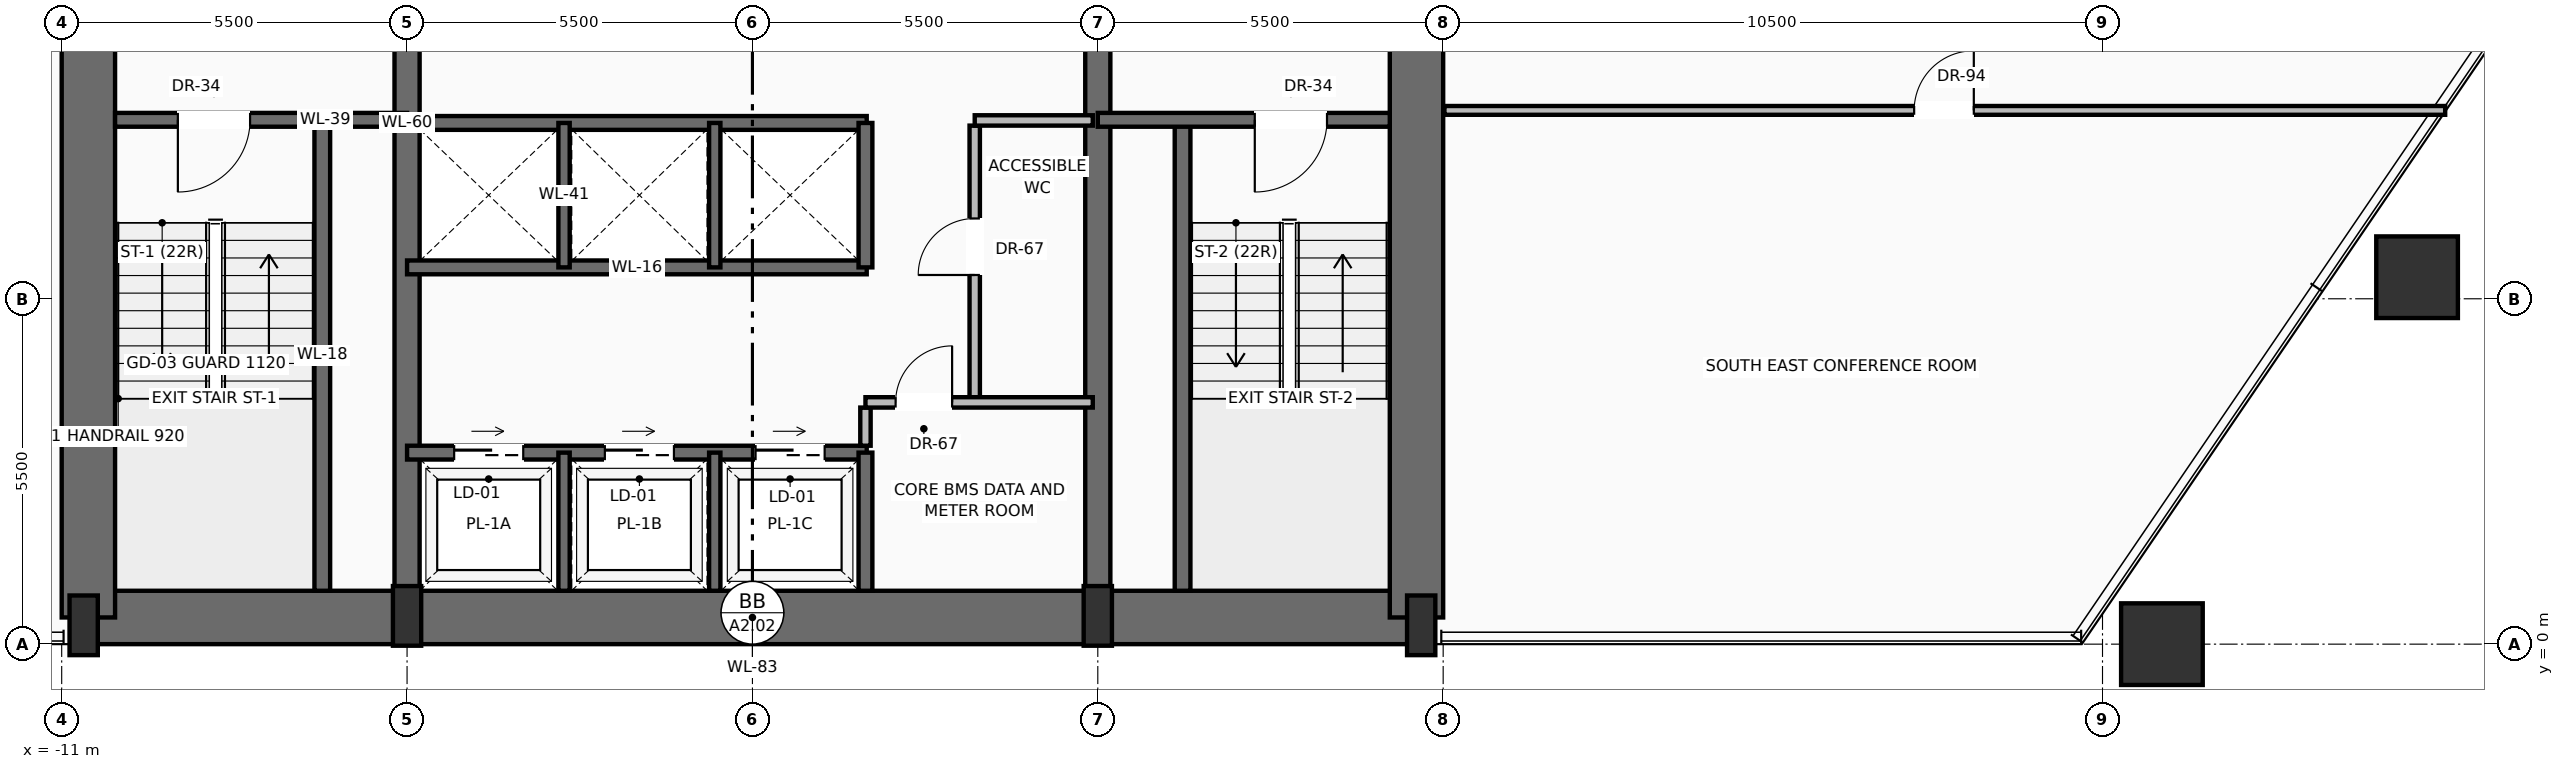
"""IFC4 building model, lengths in metres.
Left out: names, types, materials, properties, quantities, classifications, styles, units other than length and angle.
Written with IfcOpenShell. Run it as: python <this file> out.ifc"""

import sys

from ifc_helpers import new_model, si_unit, direction, frame, frame_2d, origin, origin_2d, place, context, subcontext, project, spatial, rectangle, hollow_rectangle, extrude, source, transform, mapped, element, fill, save


model = new_model("IFC4")
c1 = context("Model", 3, precision=1e-05, world=origin(), true_north=direction((0.0, 1.0)))
c2 = subcontext(c1, "Body", "Model", "MODEL_VIEW")
j1 = project(units=[si_unit("LENGTHUNIT", "METRE"), si_unit("PLANEANGLEUNIT", "RADIAN")], contexts=[c1])
p1 = place(None, origin())
s1 = spatial("IfcSite", under=j1, at=p1, CompositionType="ELEMENT")
p2 = place(p1, origin())
s2 = spatial("IfcBuilding", under=s1, at=p2, CompositionType="ELEMENT")
p3 = place(p2, frame((0.0, 0.0, 27.5)))
s3 = spatial("IfcBuildingStorey", under=s2, at=p3, CompositionType="ELEMENT", Elevation=27.5)
p4 = place(p3, frame((-10.65, 0.425, 0.0), z_axis=(0.0, 0.0, 1.0), x_axis=(1.0, 0.0, 0.0)))
e1 = element("IfcWall", 1, at=p4, inside=s3, PredefinedType="SHEAR", context=c2, shape_type="SweptSolid", body=[
    extrude(rectangle(XDim=21.3, YDim=0.85, at=frame_2d((10.65, 0.0))), origin(), (0.0, 0.0, 1.0), 3.45),
])
for number, where, z_axis, x_axis in (
    (2, (-10.575, 0.425, 0.0), (0.0, 0.0, 1.0), (0.0, 1.0, 0.0)),
    (3, (10.575, 0.425, 0.0), (0.0, 0.0, 1.0), (0.0, 1.0, 0.0)),
):
    element("IfcWall", number, at=place(p3, frame(where, z_axis=z_axis, x_axis=x_axis)), inside=s3, PredefinedType="SHEAR", context=c2, shape_type="SweptSolid", body=[
        extrude(rectangle(XDim=15.75, YDim=0.85, at=frame_2d((7.875, 0.0))), origin(), (0.0, 0.0, 1.0), 3.45),
    ])
p5 = place(p3, frame((-5.5, 0.425, 0.0), z_axis=(0.0, 0.0, 1.0), x_axis=(0.0, 1.0, 0.0)))
e4 = element("IfcWall", 4, at=p5, inside=s3, PredefinedType="SHEAR", context=c2, shape_type="SweptSolid", body=[
    extrude(rectangle(XDim=15.75, YDim=0.4, at=frame_2d((7.875, 0.0))), origin(), (0.0, 0.0, 1.0), 3.45),
])
p6 = place(p5, frame((9.075, 0.0, 0.0)))
e5 = element("IfcOpeningElement", 5, at=p6, cuts=e4, PredefinedType="OPENING", context=c2, shape_type="SweptSolid", body=[
    extrude(rectangle(XDim=1.1, YDim=2.2, at=frame_2d((0.55, 1.1))), frame((0.0, 0.21, 0.0), z_axis=(0.0, -1.0, 0.0), x_axis=(1.0, 0.0, 0.0)), (0.0, 0.0, 1.0), 0.42),
])
p7 = place(p3, frame((5.5, 0.425, 0.0), z_axis=(0.0, 0.0, 1.0), x_axis=(0.0, 1.0, 0.0)))
e6 = element("IfcWall", 6, at=p7, inside=s3, PredefinedType="SHEAR", context=c2, shape_type="SweptSolid", body=[
    extrude(rectangle(XDim=15.75, YDim=0.4, at=frame_2d((7.875, 0.0))), origin(), (0.0, 0.0, 1.0), 3.45),
])
p8 = place(p7, frame((9.075, 0.0, 0.0)))
e7 = element("IfcOpeningElement", 7, at=p8, cuts=e6, PredefinedType="OPENING", context=c2, shape_type="SweptSolid", body=[
    extrude(rectangle(XDim=1.1, YDim=2.2, at=frame_2d((0.55, 1.1))), frame((0.0, 0.21, 0.0), z_axis=(0.0, -1.0, 0.0), x_axis=(1.0, 0.0, 0.0)), (0.0, 0.0, 1.0), 0.42),
])
m1 = source(origin(), c2, "Body", "SweptSolid", [
    extrude(rectangle(XDim=0.45, YDim=0.95, at=origin_2d()), origin(), (0.0, 0.0, 1.0), 3.7),
])
for number, where, z_axis, x_axis in (
    (8, (-10.65, 0.3, 0.0), (0.0, 0.0, 1.0), (1.0, 0.0, 0.0)),
    (9, (-5.5, 0.45, 0.0), (0.0, 0.0, 1.0), (1.0, 0.0, 0.0)),
    (10, (5.5, 0.45, 0.0), (0.0, 0.0, 1.0), (1.0, 0.0, 0.0)),
    (11, (10.65, 0.3, 0.0), (0.0, 0.0, 1.0), (1.0, 0.0, 0.0)),
):
    element("IfcColumn", number, at=place(p3, frame(where, z_axis=z_axis, x_axis=x_axis)), inside=s3, PredefinedType="PILASTER", context=c2, shape_type="MappedRepresentation", body=[
        mapped(m1, transform((0.0, 0.0, 0.0), scale=1.0)),
    ])
m2 = source(origin(), c2, "Body", "SweptSolid", [
    extrude(hollow_rectangle(XDim=1.3, YDim=1.3, WallThickness=0.065, at=origin_2d()), origin(), (0.0, 0.0, 1.0), 3.692),
])
for number, where, z_axis, x_axis in (
    (12, (22.446, 0.0, 0.004), (0.017, 0.0, 1.0), (0.0, 1.0, 0.0)),
    (13, (26.51, 5.843, 0.004), (0.005, -0.017, 1.0), (0.958, 0.287, 0.0)),
):
    element("IfcColumn", number, at=place(p3, frame(where, z_axis=z_axis, x_axis=x_axis)), inside=s3, PredefinedType="COLUMN", context=c2, shape_type="MappedRepresentation", body=[
        mapped(m2, transform((0.0, 0.0, 0.0), scale=1.0)),
    ])
p9 = place(p3, frame((-6.85, 0.85, 0.0), z_axis=(0.0, 0.0, 1.0), x_axis=(0.0, 1.0, 0.0)))
e14 = element("IfcWall", 14, at=p9, inside=s3, PredefinedType="SOLIDWALL", context=c2, shape_type="SweptSolid", body=[
    extrude(rectangle(XDim=7.5, YDim=0.25, at=frame_2d((3.75, 0.0))), origin(), (0.0, 0.0, 1.0), 3.45),
])
p10 = place(p3, frame((-5.5, 8.35, 0.0), z_axis=(0.0, 0.0, 1.0), x_axis=(-1.0, 0.0, 0.0)))
e15 = element("IfcWall", 15, at=p10, inside=s3, PredefinedType="SOLIDWALL", context=c2, shape_type="SweptSolid", body=[
    extrude(rectangle(XDim=4.65, YDim=0.22, at=frame_2d((2.325, 0.0))), origin(), (0.0, 0.0, 1.0), 3.45),
])
p11 = place(p10, frame((2.5, 0.0, 0.0)))
e16 = element("IfcOpeningElement", 16, at=p11, cuts=e15, PredefinedType="OPENING", context=c2, shape_type="SweptSolid", body=[
    extrude(rectangle(XDim=1.15, YDim=2.2, at=frame_2d((0.575, 1.1))), frame((0.0, 0.12, 0.0), z_axis=(0.0, -1.0, 0.0), x_axis=(1.0, 0.0, 0.0)), (0.0, 0.0, 1.0), 0.24),
])
p12 = place(p3, frame((6.85, 0.85, 0.0), z_axis=(0.0, 0.0, 1.0), x_axis=(0.0, 1.0, 0.0)))
e17 = element("IfcWall", 17, at=p12, inside=s3, PredefinedType="SOLIDWALL", context=c2, shape_type="SweptSolid", body=[
    extrude(rectangle(XDim=7.5, YDim=0.25, at=frame_2d((3.75, 0.0))), origin(), (0.0, 0.0, 1.0), 3.45),
])
p13 = place(p3, frame((10.15, 8.35, 0.0), z_axis=(0.0, 0.0, 1.0), x_axis=(-1.0, 0.0, 0.0)))
e18 = element("IfcWall", 18, at=p13, inside=s3, PredefinedType="SOLIDWALL", context=c2, shape_type="SweptSolid", body=[
    extrude(rectangle(XDim=4.65, YDim=0.22, at=frame_2d((2.325, 0.0))), origin(), (0.0, 0.0, 1.0), 3.45),
])
p14 = place(p13, frame((1.0, 0.0, 0.0)))
e19 = element("IfcOpeningElement", 19, at=p14, cuts=e18, PredefinedType="OPENING", context=c2, shape_type="SweptSolid", body=[
    extrude(rectangle(XDim=1.15, YDim=2.2, at=frame_2d((0.575, 1.1))), frame((0.0, 0.12, 0.0), z_axis=(0.0, -1.0, 0.0), x_axis=(1.0, 0.0, 0.0)), (0.0, 0.0, 1.0), 0.24),
])
p15 = place(p3, frame((-5.5, 3.05, 0.0), z_axis=(0.0, 0.0, 1.0), x_axis=(1.0, 0.0, 0.0)))
e20 = element("IfcWall", 20, at=p15, inside=s3, PredefinedType="SOLIDWALL", context=c2, shape_type="SweptSolid", body=[
    extrude(rectangle(XDim=7.32, YDim=0.22, at=frame_2d((3.66, 0.0))), origin(), (0.0, 0.0, 1.0), 3.45),
])
p16 = place(p15, frame((0.75, 0.0, 0.0)))
e21 = element("IfcOpeningElement", 21, at=p16, cuts=e20, PredefinedType="OPENING", context=c2, shape_type="SweptSolid", body=[
    extrude(rectangle(XDim=1.1, YDim=2.2, at=frame_2d((0.55, 1.1))), frame((0.0, 0.12, 0.0), z_axis=(0.0, -1.0, 0.0), x_axis=(1.0, 0.0, 0.0)), (0.0, 0.0, 1.0), 0.24),
])
p17 = place(p15, frame((3.15, 0.0, 0.0)))
e22 = element("IfcOpeningElement", 22, at=p17, cuts=e20, PredefinedType="OPENING", context=c2, shape_type="SweptSolid", body=[
    extrude(rectangle(XDim=1.1, YDim=2.2, at=frame_2d((0.55, 1.1))), frame((0.0, 0.12, 0.0), z_axis=(0.0, -1.0, 0.0), x_axis=(1.0, 0.0, 0.0)), (0.0, 0.0, 1.0), 0.24),
])
p18 = place(p15, frame((5.55, 0.0, 0.0)))
e23 = element("IfcOpeningElement", 23, at=p18, cuts=e20, PredefinedType="OPENING", context=c2, shape_type="SweptSolid", body=[
    extrude(rectangle(XDim=1.1, YDim=2.2, at=frame_2d((0.55, 1.1))), frame((0.0, 0.12, 0.0), z_axis=(0.0, -1.0, 0.0), x_axis=(1.0, 0.0, 0.0)), (0.0, 0.0, 1.0), 0.24),
])
p19 = place(p3, frame((1.8, 0.85, 0.0), z_axis=(0.0, 0.0, 1.0), x_axis=(0.0, 1.0, 0.0)))
e24 = element("IfcWall", 24, at=p19, inside=s3, PredefinedType="SOLIDWALL", context=c2, shape_type="SweptSolid", body=[
    extrude(rectangle(XDim=2.2, YDim=0.22, at=frame_2d((1.1, 0.0))), origin(), (0.0, 0.0, 1.0), 3.45),
])
for number, where, z_axis, x_axis in (
    (25, (-3.0, 0.85, 0.0), (0.0, 0.0, 1.0), (0.0, 1.0, 0.0)),
    (26, (-0.6, 0.85, 0.0), (0.0, 0.0, 1.0), (0.0, 1.0, 0.0)),
):
    element("IfcWall", number, at=place(p3, frame(where, z_axis=z_axis, x_axis=x_axis)), inside=s3, PredefinedType="SOLIDWALL", context=c2, shape_type="SweptSolid", body=[
        extrude(rectangle(XDim=2.2, YDim=0.18, at=frame_2d((1.1, 0.0))), origin(), (0.0, 0.0, 1.0), 3.45),
    ])
p20 = place(p3, frame((1.8, 3.16, 0.0), z_axis=(0.0, 0.0, 1.0), x_axis=(0.0, 1.0, 0.0)))
e27 = element("IfcWall", 27, at=p20, inside=s3, PredefinedType="PARTITIONING", context=c2, shape_type="SweptSolid", body=[
    extrude(rectangle(XDim=0.608, YDim=0.165, at=frame_2d((0.304, 0.0))), origin(), (0.0, 0.0, 1.0), 3.442),
])
p21 = place(p3, frame((3.54, 3.933, 0.0), z_axis=(0.0, 0.0, 1.0), x_axis=(0.0, 1.0, 0.0)))
e28 = element("IfcWall", 28, at=p21, inside=s3, PredefinedType="PARTITIONING", context=c2, shape_type="SweptSolid", body=[
    extrude(rectangle(XDim=4.325, YDim=0.165, at=frame_2d((2.163, 0.0))), origin(), (0.0, 0.0, 1.0), 3.442),
])
p22 = place(p21, frame((1.946, 0.0, 0.0)))
e29 = element("IfcOpeningElement", 29, at=p22, cuts=e28, PredefinedType="OPENING", context=c2, shape_type="SweptSolid", body=[
    extrude(rectangle(XDim=0.9, YDim=2.1, at=frame_2d((0.45, 1.05))), frame((0.0, 0.093, 0.0), z_axis=(0.0, -1.0, 0.0), x_axis=(1.0, 0.0, 0.0)), (0.0, 0.0, 1.0), 0.185),
])
p23 = place(p3, frame((3.54, 8.34, 0.0), z_axis=(0.0, 0.0, 1.0), x_axis=(1.0, 0.0, 0.0)))
e30 = element("IfcWall", 30, at=p23, inside=s3, PredefinedType="PARTITIONING", context=c2, shape_type="SweptSolid", body=[
    extrude(rectangle(XDim=1.88, YDim=0.165, at=frame_2d((0.94, 0.0))), origin(), (0.0, 0.0, 1.0), 3.442),
])
p24 = place(p3, frame((1.8, 3.85, 0.0), z_axis=(0.0, 0.0, 1.0), x_axis=(1.0, 0.0, 0.0)))
e31 = element("IfcWall", 31, at=p24, inside=s3, PredefinedType="PARTITIONING", context=c2, shape_type="SweptSolid", body=[
    extrude(rectangle(XDim=3.62, YDim=0.165, at=frame_2d((1.81, 0.0))), origin(), (0.0, 0.0, 1.0), 3.442),
])
p25 = place(p24, frame((0.48, 0.0, 0.0)))
e32 = element("IfcOpeningElement", 32, at=p25, cuts=e31, PredefinedType="OPENING", context=c2, shape_type="SweptSolid", body=[
    extrude(rectangle(XDim=0.9, YDim=2.1, at=frame_2d((0.45, 1.05))), frame((0.0, 0.093, 0.0), z_axis=(0.0, -1.0, 0.0), x_axis=(1.0, 0.0, 0.0)), (0.0, 0.0, 1.0), 0.185),
])
for number, where, z_axis, x_axis in (
    (33, (-5.5, 6.0, 0.0), (0.0, 0.0, 1.0), (1.0, 0.0, 0.0)),
    (34, (-5.5, 8.3, 0.0), (0.0, 0.0, 1.0), (1.0, 0.0, 0.0)),
):
    element("IfcWall", number, at=place(p3, frame(where, z_axis=z_axis, x_axis=x_axis)), inside=s3, PredefinedType="SOLIDWALL", context=c2, shape_type="SweptSolid", body=[
        extrude(rectangle(XDim=7.32, YDim=0.22, at=frame_2d((3.66, 0.0))), origin(), (0.0, 0.0, 1.0), 3.45),
    ])
p26 = place(p3, frame((1.8, 6.0, 0.0), z_axis=(0.0, 0.0, 1.0), x_axis=(0.0, 1.0, 0.0)))
e35 = element("IfcWall", 35, at=p26, inside=s3, PredefinedType="SOLIDWALL", context=c2, shape_type="SweptSolid", body=[
    extrude(rectangle(XDim=2.3, YDim=0.22, at=frame_2d((1.15, 0.0))), origin(), (0.0, 0.0, 1.0), 3.45),
])
for number, where, z_axis, x_axis in (
    (36, (-3.0, 6.0, 0.0), (0.0, 0.0, 1.0), (0.0, 1.0, 0.0)),
    (37, (-0.6, 6.0, 0.0), (0.0, 0.0, 1.0), (0.0, 1.0, 0.0)),
):
    element("IfcWall", number, at=place(p3, frame(where, z_axis=z_axis, x_axis=x_axis)), inside=s3, PredefinedType="SOLIDWALL", context=c2, shape_type="SweptSolid", body=[
        extrude(rectangle(XDim=2.3, YDim=0.18, at=frame_2d((1.15, 0.0))), origin(), (0.0, 0.0, 1.0), 3.45),
    ])
p27 = place(p3, frame((11.02, 8.5, 0.0), z_axis=(0.0, 0.0, 1.0), x_axis=(1.0, 0.0, 0.0)))
e38 = element("IfcWall", 38, at=p27, inside=s3, PredefinedType="PARTITIONING", context=c2, shape_type="SweptSolid", body=[
    extrude(rectangle(XDim=15.937, YDim=0.14, at=frame_2d((7.969, 0.0))), origin(), (0.0, 0.0, 1.0), 3.442),
])
p28 = place(p27, frame((7.48, 0.0, 0.0)))
e39 = element("IfcOpeningElement", 39, at=p28, cuts=e38, PredefinedType="OPENING", context=c2, shape_type="SweptSolid", body=[
    extrude(rectangle(XDim=0.95, YDim=2.2, at=frame_2d((0.475, 1.1))), frame((0.0, 0.08, 0.0), z_axis=(0.0, -1.0, 0.0), x_axis=(1.0, 0.0, 0.0)), (0.0, 0.0, 1.0), 0.16),
])
m3 = source(origin(), c2, "Body", "SweptSolid", [
    extrude(rectangle(XDim=1.15, YDim=2.2, at=frame_2d((0.575, 1.1))), frame((0.0, 0.025, 0.0), z_axis=(0.0, -1.0, 0.0), x_axis=(1.0, 0.0, 0.0)), (0.0, 0.0, 1.0), 0.05),
])
p29 = place(p11, origin())
e40 = element("IfcDoor", 40, at=p29, inside=s3, OperationType="SINGLE_SWING_RIGHT", PredefinedType="DOOR", context=c2, shape_type="MappedRepresentation", body=[
    mapped(m3, transform((0.0, 0.0, 0.0), scale=1.0)),
])
fill(e16, e40)
p30 = place(p14, origin())
e41 = element("IfcDoor", 41, at=p30, inside=s3, OperationType="SINGLE_SWING_RIGHT", PredefinedType="DOOR", context=c2, shape_type="MappedRepresentation", body=[
    mapped(m3, transform((0.0, 0.0, 0.0), scale=1.0)),
])
fill(e19, e41)
m4 = source(origin(), c2, "Body", "SweptSolid", [
    extrude(rectangle(XDim=1.1, YDim=2.2, at=frame_2d((0.55, 1.1))), frame((0.0, 0.025, 0.0), z_axis=(0.0, -1.0, 0.0), x_axis=(1.0, 0.0, 0.0)), (0.0, 0.0, 1.0), 0.05),
])
p31 = place(p16, origin())
e42 = element("IfcDoor", 42, at=p31, inside=s3, OperationType="SLIDING_TO_RIGHT", PredefinedType="DOOR", context=c2, shape_type="MappedRepresentation", body=[
    mapped(m4, transform((0.0, 0.0, 0.0), scale=1.0)),
])
fill(e21, e42)
p32 = place(p17, origin())
e43 = element("IfcDoor", 43, at=p32, inside=s3, OperationType="SLIDING_TO_RIGHT", PredefinedType="DOOR", context=c2, shape_type="MappedRepresentation", body=[
    mapped(m4, transform((0.0, 0.0, 0.0), scale=1.0)),
])
fill(e22, e43)
p33 = place(p18, origin())
e44 = element("IfcDoor", 44, at=p33, inside=s3, OperationType="SLIDING_TO_RIGHT", PredefinedType="DOOR", context=c2, shape_type="MappedRepresentation", body=[
    mapped(m4, transform((0.0, 0.0, 0.0), scale=1.0)),
])
fill(e23, e44)
m5 = source(origin(), c2, "Body", "SweptSolid", [
    extrude(rectangle(XDim=0.9, YDim=2.1, at=frame_2d((0.45, 1.05))), frame((0.0, 0.025, 0.0), z_axis=(0.0, -1.0, 0.0), x_axis=(1.0, 0.0, 0.0)), (0.0, 0.0, 1.0), 0.05),
])
p34 = place(p25, origin())
e45 = element("IfcDoor", 45, at=p34, inside=s3, OperationType="SINGLE_SWING_RIGHT", PredefinedType="DOOR", context=c2, shape_type="MappedRepresentation", body=[
    mapped(m5, transform((0.0, 0.0, 0.0), scale=1.0)),
])
fill(e32, e45)
p35 = place(p22, origin())
e46 = element("IfcDoor", 46, at=p35, inside=s3, OperationType="SINGLE_SWING_LEFT", PredefinedType="DOOR", context=c2, shape_type="MappedRepresentation", body=[
    mapped(m5, transform((0.0, 0.0, 0.0), scale=1.0)),
])
fill(e29, e46)
m6 = source(origin(), c2, "Body", "SweptSolid", [
    extrude(rectangle(XDim=0.95, YDim=2.2, at=frame_2d((0.475, 1.1))), frame((0.0, 0.025, 0.0), z_axis=(0.0, -1.0, 0.0), x_axis=(1.0, 0.0, 0.0)), (0.0, 0.0, 1.0), 0.05),
])
p36 = place(p28, origin())
e47 = element("IfcDoor", 47, at=p36, inside=s3, OperationType="SINGLE_SWING_RIGHT", PredefinedType="DOOR", context=c2, shape_type="MappedRepresentation", body=[
    mapped(m6, transform((0.0, 0.0, 0.0), scale=1.0)),
])
fill(e39, e47)
save(model, sys.argv[1])
